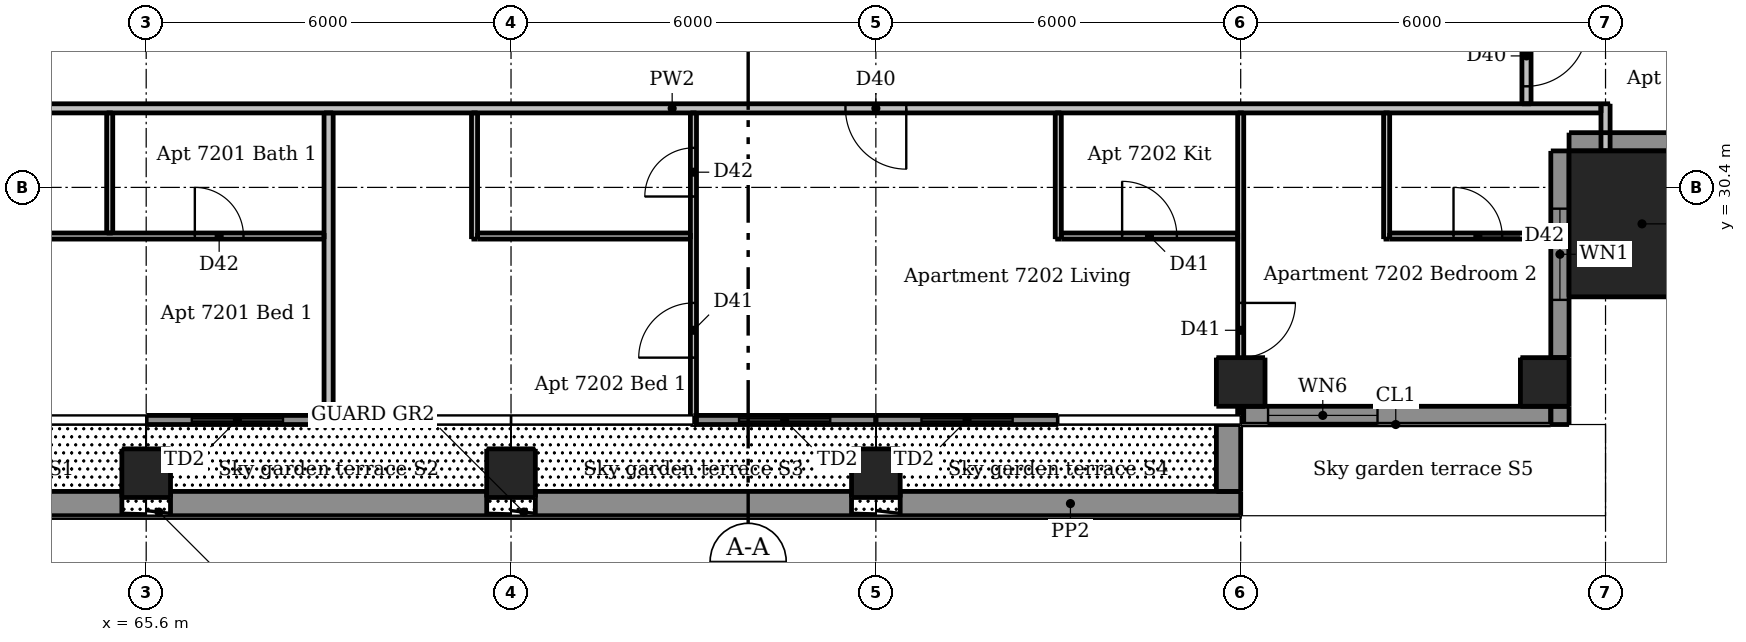
"""IFC4 building model, lengths in metres.
Left out: names, types, materials, properties, quantities, classifications, styles, units other than length and angle.
Written with IfcOpenShell. Run it as: python <this file> out.ifc"""

import sys

from ifc_helpers import new_model, si_unit, direction, frame, frame_2d, origin, origin_2d, place, context, subcontext, project, spatial, rectangle, extrude, element, fill, save


model = new_model("IFC4")
c1 = context("Model", 3, precision=1e-05, world=origin(), true_north=direction((0.0, 1.0)))
c2 = subcontext(c1, "Body", "Model", "MODEL_VIEW")
j1 = project(units=[si_unit("LENGTHUNIT", "METRE"), si_unit("PLANEANGLEUNIT", "RADIAN")], contexts=[c1])
p1 = place(None, origin())
s1 = spatial("IfcSite", under=j1, at=p1, CompositionType="ELEMENT")
p2 = place(p1, origin())
s2 = spatial("IfcBuilding", under=s1, at=p2, CompositionType="ELEMENT")
p3 = place(p2, frame((0.0, 0.0, 268.6)))
s3 = spatial("IfcBuildingStorey", under=s2, at=p3, CompositionType="ELEMENT", Elevation=268.6)
for number, where, z_axis, x_axis in (
    (1, (65.6, 25.7, 0.0), (0.0, 0.0, 1.0), (1.0, 0.0, 0.0)),
    (2, (71.6, 25.7, 0.0), (0.0, 0.0, 1.0), (1.0, 0.0, 0.0)),
    (3, (77.6, 25.7, 0.0), (0.0, 0.0, 1.0), (1.0, 0.0, 0.0)),
):
    element("IfcColumn", number, at=place(p3, frame(where, z_axis=z_axis, x_axis=x_axis)), inside=s3, PredefinedType="COLUMN", context=c2, shape_type="SweptSolid", body=[
        extrude(rectangle(XDim=0.8, YDim=0.8, at=origin_2d()), origin(), (0.0, 0.0, 1.0), 3.3),
    ])
for number, where, z_axis, x_axis in (
    (4, (83.6, 27.2, 0.0), (0.0, 0.0, 1.0), (1.0, 0.0, 0.0)),
    (5, (88.6, 27.2, 0.0), (0.0, 0.0, 1.0), (1.0, 0.0, 0.0)),
):
    element("IfcColumn", number, at=place(p3, frame(where, z_axis=z_axis, x_axis=x_axis)), inside=s3, PredefinedType="COLUMN", context=c2, shape_type="SweptSolid", body=[
        extrude(rectangle(XDim=0.8, YDim=0.8, at=origin_2d()), origin(), (0.0, 0.0, 1.0), 3.05),
    ])
p4 = place(p3, frame((90.2, 29.8, 0.0), z_axis=(0.0, 0.0, 1.0), x_axis=(1.0, 0.0, 0.0)))
e6 = element("IfcColumn", 6, at=p4, inside=s3, PredefinedType="COLUMN", context=c2, shape_type="SweptSolid", body=[
    extrude(rectangle(XDim=2.4, YDim=2.4, at=origin_2d()), origin(), (0.0, 0.0, 1.0), 3.3),
])
p5 = place(p3, frame((88.85, 26.5, 0.0), z_axis=(0.0, 0.0, 1.0), x_axis=(0.0, 1.0, 0.0)))
e7 = element("IfcWall", 7, at=p5, inside=s3, PredefinedType="SOLIDWALL", context=c2, shape_type="SweptSolid", body=[
    extrude(rectangle(XDim=0.3, YDim=0.3, at=frame_2d((0.15, 0.0))), origin(), (0.0, 0.0, 1.0), 3.05),
])
p6 = place(p3, frame((88.85, 27.6, 0.0), z_axis=(0.0, 0.0, 1.0), x_axis=(0.0, 1.0, 0.0)))
e8 = element("IfcWall", 8, at=p6, inside=s3, PredefinedType="SOLIDWALL", context=c2, shape_type="SweptSolid", body=[
    extrude(rectangle(XDim=3.4, YDim=0.3, at=frame_2d((1.7, 0.0))), origin(), (0.0, 0.0, 1.0), 3.05),
])
p7 = place(p6, frame((0.95, 0.0, 0.9)))
e9 = element("IfcOpeningElement", 9, at=p7, cuts=e8, PredefinedType="OPENING", context=c2, shape_type="SweptSolid", body=[
    extrude(rectangle(XDim=1.5, YDim=1.5, at=frame_2d((0.75, 0.75))), frame((0.0, 0.16, 0.0), z_axis=(0.0, -1.0, 0.0), x_axis=(1.0, 0.0, 0.0)), (0.0, 0.0, 1.0), 0.32),
])
p8 = place(p3, frame((89.0, 31.15, 0.0), z_axis=(0.0, 0.0, 1.0), x_axis=(1.0, 0.0, 0.0)))
e10 = element("IfcWall", 10, at=p8, inside=s3, PredefinedType="SOLIDWALL", context=c2, shape_type="SweptSolid", body=[
    extrude(rectangle(XDim=3.4, YDim=0.3, at=frame_2d((1.7, 0.0))), origin(), (0.0, 0.0, 1.0), 3.05),
])
p9 = place(p3, frame((65.6, 26.575, 0.0), z_axis=(0.0, 0.0, 1.0), x_axis=(1.0, 0.0, 0.0)))
e11 = element("IfcWall", 11, at=p9, inside=s3, PredefinedType="SOLIDWALL", context=c2, shape_type="SweptSolid", body=[
    extrude(rectangle(XDim=3.0, YDim=0.15, at=frame_2d((1.5, 0.0))), origin(), (0.0, 0.0, 1.0), 3.05),
])
p10 = place(p9, frame((0.75, 0.0, 0.0)))
e12 = element("IfcOpeningElement", 12, at=p10, cuts=e11, PredefinedType="OPENING", context=c2, shape_type="SweptSolid", body=[
    extrude(rectangle(XDim=1.5, YDim=2.4, at=frame_2d((0.75, 1.2))), frame((0.0, 0.085, 0.0), z_axis=(0.0, -1.0, 0.0), x_axis=(1.0, 0.0, 0.0)), (0.0, 0.0, 1.0), 0.17),
])
p11 = place(p3, frame((74.6, 26.575, 0.0), z_axis=(0.0, 0.0, 1.0), x_axis=(1.0, 0.0, 0.0)))
e13 = element("IfcWall", 13, at=p11, inside=s3, PredefinedType="SOLIDWALL", context=c2, shape_type="SweptSolid", body=[
    extrude(rectangle(XDim=3.0, YDim=0.15, at=frame_2d((1.5, 0.0))), origin(), (0.0, 0.0, 1.0), 3.05),
])
p12 = place(p11, frame((0.75, 0.0, 0.0)))
e14 = element("IfcOpeningElement", 14, at=p12, cuts=e13, PredefinedType="OPENING", context=c2, shape_type="SweptSolid", body=[
    extrude(rectangle(XDim=1.5, YDim=2.4, at=frame_2d((0.75, 1.2))), frame((0.0, 0.085, 0.0), z_axis=(0.0, -1.0, 0.0), x_axis=(1.0, 0.0, 0.0)), (0.0, 0.0, 1.0), 0.17),
])
p13 = place(p3, frame((77.6, 26.575, 0.0), z_axis=(0.0, 0.0, 1.0), x_axis=(1.0, 0.0, 0.0)))
e15 = element("IfcWall", 15, at=p13, inside=s3, PredefinedType="SOLIDWALL", context=c2, shape_type="SweptSolid", body=[
    extrude(rectangle(XDim=3.0, YDim=0.15, at=frame_2d((1.5, 0.0))), origin(), (0.0, 0.0, 1.0), 3.05),
])
p14 = place(p13, frame((0.75, 0.0, 0.0)))
e16 = element("IfcOpeningElement", 16, at=p14, cuts=e15, PredefinedType="OPENING", context=c2, shape_type="SweptSolid", body=[
    extrude(rectangle(XDim=1.5, YDim=2.4, at=frame_2d((0.75, 1.2))), frame((0.0, 0.085, 0.0), z_axis=(0.0, -1.0, 0.0), x_axis=(1.0, 0.0, 0.0)), (0.0, 0.0, 1.0), 0.17),
])
p15 = place(p3, frame((83.6, 26.65, 0.0), z_axis=(0.0, 0.0, 1.0), x_axis=(1.0, 0.0, 0.0)))
e17 = element("IfcWall", 17, at=p15, inside=s3, PredefinedType="SOLIDWALL", context=c2, shape_type="SweptSolid", body=[
    extrude(rectangle(XDim=5.1, YDim=0.3, at=frame_2d((2.55, 0.0))), origin(), (0.0, 0.0, 1.0), 3.05),
])
p16 = place(p15, frame((0.45, 0.0, 0.15)))
e18 = element("IfcOpeningElement", 18, at=p16, cuts=e17, PredefinedType="OPENING", context=c2, shape_type="SweptSolid", body=[
    extrude(rectangle(XDim=1.8, YDim=2.1, at=frame_2d((0.9, 1.05))), frame((0.0, 0.16, 0.0), z_axis=(0.0, -1.0, 0.0), x_axis=(1.0, 0.0, 0.0)), (0.0, 0.0, 1.0), 0.32),
])
for number, where, z_axis, x_axis in (
    (19, (60.0, 25.2, 0.03), (0.0, 0.0, 1.0), (1.0, 0.0, 0.0)),
    (20, (66.0, 25.2, 0.03), (0.0, 0.0, 1.0), (1.0, 0.0, 0.0)),
    (21, (72.0, 25.2, 0.03), (0.0, 0.0, 1.0), (1.0, 0.0, 0.0)),
):
    element("IfcWall", number, at=place(p3, frame(where, z_axis=z_axis, x_axis=x_axis)), inside=s3, PredefinedType="PARAPET", context=c2, shape_type="SweptSolid", body=[
        extrude(rectangle(XDim=5.2, YDim=0.4, at=frame_2d((2.6, 0.0))), origin(), (0.0, 0.0, 1.0), 1.1),
    ])
p17 = place(p3, frame((78.0, 25.2, 0.03), z_axis=(0.0, 0.0, 1.0), x_axis=(1.0, 0.0, 0.0)))
e22 = element("IfcWall", 22, at=p17, inside=s3, PredefinedType="PARAPET", context=c2, shape_type="SweptSolid", body=[
    extrude(rectangle(XDim=5.6, YDim=0.4, at=frame_2d((2.8, 0.0))), origin(), (0.0, 0.0, 1.0), 1.1),
])
p18 = place(p3, frame((83.4, 25.4, 0.03), z_axis=(0.0, 0.0, 1.0), x_axis=(0.0, 1.0, 0.0)))
e23 = element("IfcWall", 23, at=p18, inside=s3, PredefinedType="PARAPET", context=c2, shape_type="SweptSolid", body=[
    extrude(rectangle(XDim=1.1, YDim=0.4, at=frame_2d((0.55, 0.0))), origin(), (0.0, 0.0, 1.0), 1.1),
])
p19 = place(p3, frame((65.0, 29.65, 0.0), z_axis=(0.0, 0.0, 1.0), x_axis=(0.0, 1.0, 0.0)))
e24 = element("IfcWall", 24, at=p19, inside=s3, PredefinedType="PARTITIONING", context=c2, shape_type="SweptSolid", body=[
    extrude(rectangle(XDim=1.975, YDim=0.1, at=frame_2d((0.988, 0.0))), origin(), (0.0, 0.0, 1.0), 3.05),
])
p20 = place(p3, frame((71.0, 29.55, 0.0), z_axis=(0.0, 0.0, 1.0), x_axis=(0.0, 1.0, 0.0)))
e25 = element("IfcWall", 25, at=p20, inside=s3, PredefinedType="PARTITIONING", context=c2, shape_type="SweptSolid", body=[
    extrude(rectangle(XDim=2.075, YDim=0.1, at=frame_2d((1.038, 0.0))), origin(), (0.0, 0.0, 1.0), 3.05),
])
p21 = place(p3, frame((74.6, 26.5, 0.0), z_axis=(0.0, 0.0, 1.0), x_axis=(0.0, 1.0, 0.0)))
e26 = element("IfcWall", 26, at=p21, inside=s3, PredefinedType="PARTITIONING", context=c2, shape_type="SweptSolid", body=[
    extrude(rectangle(XDim=5.125, YDim=0.1, at=frame_2d((2.562, 0.0))), origin(), (0.0, 0.0, 1.0), 3.05),
])
p22 = place(p21, frame((1.1, 0.0, 0.0)))
e27 = element("IfcOpeningElement", 27, at=p22, cuts=e26, PredefinedType="OPENING", context=c2, shape_type="SweptSolid", body=[
    extrude(rectangle(XDim=0.9, YDim=2.1, at=frame_2d((0.45, 1.05))), frame((0.0, 0.06, 0.0), z_axis=(0.0, -1.0, 0.0), x_axis=(1.0, 0.0, 0.0)), (0.0, 0.0, 1.0), 0.12),
])
p23 = place(p21, frame((3.75, 0.0, 0.0)))
e28 = element("IfcOpeningElement", 28, at=p23, cuts=e26, PredefinedType="OPENING", context=c2, shape_type="SweptSolid", body=[
    extrude(rectangle(XDim=0.8, YDim=2.1, at=frame_2d((0.4, 1.05))), frame((0.0, 0.06, 0.0), z_axis=(0.0, -1.0, 0.0), x_axis=(1.0, 0.0, 0.0)), (0.0, 0.0, 1.0), 0.12),
])
p24 = place(p3, frame((80.6, 29.55, 0.0), z_axis=(0.0, 0.0, 1.0), x_axis=(0.0, 1.0, 0.0)))
e29 = element("IfcWall", 29, at=p24, inside=s3, PredefinedType="PARTITIONING", context=c2, shape_type="SweptSolid", body=[
    extrude(rectangle(XDim=2.075, YDim=0.1, at=frame_2d((1.038, 0.0))), origin(), (0.0, 0.0, 1.0), 3.05),
])
p25 = place(p3, frame((83.6, 31.625, 0.0), z_axis=(0.0, 0.0, 1.0), x_axis=(0.0, -1.0, 0.0)))
e30 = element("IfcWall", 30, at=p25, inside=s3, PredefinedType="PARTITIONING", context=c2, shape_type="SweptSolid", body=[
    extrude(rectangle(XDim=5.125, YDim=0.1, at=frame_2d((2.562, 0.0))), origin(), (0.0, 0.0, 1.0), 2.647),
])
p26 = place(p25, frame((3.125, 0.0, 0.0)))
e31 = element("IfcOpeningElement", 31, at=p26, cuts=e30, PredefinedType="OPENING", context=c2, shape_type="SweptSolid", body=[
    extrude(rectangle(XDim=0.9, YDim=2.1, at=frame_2d((0.45, 1.05))), frame((0.0, 0.06, 0.0), z_axis=(0.0, -1.0, 0.0), x_axis=(1.0, 0.0, 0.0)), (0.0, 0.0, 1.0), 0.12),
])
p27 = place(p3, frame((86.0, 29.55, 0.0), z_axis=(0.0, 0.0, 1.0), x_axis=(0.0, 1.0, 0.0)))
e32 = element("IfcWall", 32, at=p27, inside=s3, PredefinedType="PARTITIONING", context=c2, shape_type="SweptSolid", body=[
    extrude(rectangle(XDim=2.075, YDim=0.1, at=frame_2d((1.038, 0.0))), origin(), (0.0, 0.0, 1.0), 3.05),
])
p28 = place(p3, frame((62.65, 29.6, 0.0), z_axis=(0.0, 0.0, 1.0), x_axis=(1.0, 0.0, 0.0)))
e33 = element("IfcWall", 33, at=p28, inside=s3, PredefinedType="PARTITIONING", context=c2, shape_type="SweptSolid", body=[
    extrude(rectangle(XDim=5.875, YDim=0.1, at=frame_2d((2.938, 0.0))), origin(), (0.0, 0.0, 1.0), 3.05),
])
p29 = place(p28, frame((3.75, 0.0, 0.0)))
e34 = element("IfcOpeningElement", 34, at=p29, cuts=e33, PredefinedType="OPENING", context=c2, shape_type="SweptSolid", body=[
    extrude(rectangle(XDim=0.8, YDim=2.1, at=frame_2d((0.4, 1.05))), frame((0.0, 0.06, 0.0), z_axis=(0.0, -1.0, 0.0), x_axis=(1.0, 0.0, 0.0)), (0.0, 0.0, 1.0), 0.12),
])
p30 = place(p3, frame((71.05, 29.6, 0.0), z_axis=(0.0, 0.0, 1.0), x_axis=(1.0, 0.0, 0.0)))
e35 = element("IfcWall", 35, at=p30, inside=s3, PredefinedType="PARTITIONING", context=c2, shape_type="SweptSolid", body=[
    extrude(rectangle(XDim=3.5, YDim=0.1, at=frame_2d((1.75, 0.0))), origin(), (0.0, 0.0, 1.0), 3.05),
])
p31 = place(p3, frame((80.65, 29.6, 0.0), z_axis=(0.0, 0.0, 1.0), x_axis=(1.0, 0.0, 0.0)))
e36 = element("IfcWall", 36, at=p31, inside=s3, PredefinedType="PARTITIONING", context=c2, shape_type="SweptSolid", body=[
    extrude(rectangle(XDim=2.9, YDim=0.1, at=frame_2d((1.45, 0.0))), origin(), (0.0, 0.0, 1.0), 3.05),
])
p32 = place(p31, frame((1.0, 0.0, 0.0)))
e37 = element("IfcOpeningElement", 37, at=p32, cuts=e36, PredefinedType="OPENING", context=c2, shape_type="SweptSolid", body=[
    extrude(rectangle(XDim=0.9, YDim=2.1, at=frame_2d((0.45, 1.05))), frame((0.0, 0.06, 0.0), z_axis=(0.0, -1.0, 0.0), x_axis=(1.0, 0.0, 0.0)), (0.0, 0.0, 1.0), 0.12),
])
p33 = place(p3, frame((86.05, 29.6, 0.0), z_axis=(0.0, 0.0, 1.0), x_axis=(1.0, 0.0, 0.0)))
e38 = element("IfcWall", 38, at=p33, inside=s3, PredefinedType="PARTITIONING", context=c2, shape_type="SweptSolid", body=[
    extrude(rectangle(XDim=2.75, YDim=0.1, at=frame_2d((1.375, 0.0))), origin(), (0.0, 0.0, 1.0), 3.05),
])
p34 = place(p33, frame((1.05, 0.0, 0.0)))
e39 = element("IfcOpeningElement", 39, at=p34, cuts=e38, PredefinedType="OPENING", context=c2, shape_type="SweptSolid", body=[
    extrude(rectangle(XDim=0.8, YDim=2.1, at=frame_2d((0.4, 1.05))), frame((0.0, 0.06, 0.0), z_axis=(0.0, -1.0, 0.0), x_axis=(1.0, 0.0, 0.0)), (0.0, 0.0, 1.0), 0.12),
])
p35 = place(p3, frame((68.6, 26.5, 0.0), z_axis=(0.0, 0.0, 1.0), x_axis=(0.0, 1.0, 0.0)))
e40 = element("IfcWall", 40, at=p35, inside=s3, PredefinedType="PARTITIONING", context=c2, shape_type="SweptSolid", body=[
    extrude(rectangle(XDim=5.125, YDim=0.15, at=frame_2d((2.562, 0.0))), origin(), (0.0, 0.0, 1.0), 3.05),
])
p36 = place(p3, frame((88.3, 61.175, 0.0), z_axis=(0.0, 0.0, 1.0), x_axis=(0.0, -1.0, 0.0)))
e41 = element("IfcWall", 41, at=p36, inside=s3, PredefinedType="PARTITIONING", context=c2, shape_type="SweptSolid", body=[
    extrude(rectangle(XDim=29.4, YDim=0.15, at=frame_2d((14.7, 0.0))), origin(), (0.0, 0.0, 1.0), 3.05),
])
p37 = place(p36, frame((28.113, 0.0, 0.0)))
e42 = element("IfcOpeningElement", 42, at=p37, cuts=e41, PredefinedType="OPENING", context=c2, shape_type="SweptSolid", body=[
    extrude(rectangle(XDim=1.0, YDim=2.1, at=frame_2d((0.5, 1.05))), frame((0.0, 0.085, 0.0), z_axis=(0.0, -1.0, 0.0), x_axis=(1.0, 0.0, 0.0)), (0.0, 0.0, 1.0), 0.17),
])
p38 = place(p36, frame((10.775, 0.0, 0.0)))
e43 = element("IfcOpeningElement", 43, at=p38, cuts=e41, PredefinedType="OPENING", context=c2, shape_type="SweptSolid", body=[
    extrude(rectangle(XDim=1.0, YDim=2.1, at=frame_2d((0.5, 1.05))), frame((0.0, 0.085, 0.0), z_axis=(0.0, -1.0, 0.0), x_axis=(1.0, 0.0, 0.0)), (0.0, 0.0, 1.0), 0.17),
])
p39 = place(p3, frame((89.6, 31.0, 0.0), z_axis=(0.0, 0.0, 1.0), x_axis=(0.0, 1.0, 0.0)))
e44 = element("IfcWall", 44, at=p39, inside=s3, PredefinedType="PARTITIONING", context=c2, shape_type="SweptSolid", body=[
    extrude(rectangle(XDim=0.775, YDim=0.15, at=frame_2d((0.387, 0.0))), origin(), (0.0, 0.0, 1.0), 3.05),
])
p40 = place(p3, frame((89.525, 31.7, 0.0), z_axis=(0.0, 0.0, 1.0), x_axis=(-1.0, 0.0, 0.0)))
e45 = element("IfcWall", 45, at=p40, inside=s3, PredefinedType="PARTITIONING", context=c2, shape_type="SweptSolid", body=[
    extrude(rectangle(XDim=30.55, YDim=0.15, at=frame_2d((15.275, 0.0))), origin(), (0.0, 0.0, 1.0), 3.05),
])
p41 = place(p40, frame((28.275, 0.0, 0.0)))
e46 = element("IfcOpeningElement", 46, at=p41, cuts=e45, PredefinedType="OPENING", context=c2, shape_type="SweptSolid", body=[
    extrude(rectangle(XDim=1.0, YDim=2.1, at=frame_2d((0.5, 1.05))), frame((0.0, 0.085, 0.0), z_axis=(0.0, -1.0, 0.0), x_axis=(1.0, 0.0, 0.0)), (0.0, 0.0, 1.0), 0.17),
])
p42 = place(p40, frame((11.425, 0.0, 0.0)))
e47 = element("IfcOpeningElement", 47, at=p42, cuts=e45, PredefinedType="OPENING", context=c2, shape_type="SweptSolid", body=[
    extrude(rectangle(XDim=1.0, YDim=2.1, at=frame_2d((0.5, 1.05))), frame((0.0, 0.085, 0.0), z_axis=(0.0, -1.0, 0.0), x_axis=(1.0, 0.0, 0.0)), (0.0, 0.0, 1.0), 0.17),
])
p43 = place(p7, origin())
e48 = element("IfcWindow", 48, at=p43, inside=s3, PartitioningType="DOUBLE_PANEL_VERTICAL", PredefinedType="WINDOW", context=c2, shape_type="SweptSolid", body=[
    extrude(rectangle(XDim=1.5, YDim=1.5, at=frame_2d((0.75, 0.75))), frame((0.0, 0.03, 0.0), z_axis=(0.0, -1.0, 0.0), x_axis=(1.0, 0.0, 0.0)), (0.0, 0.0, 1.0), 0.06),
])
fill(e9, e48)
p44 = place(p10, origin())
e49 = element("IfcDoor", 49, at=p44, inside=s3, OperationType="DOUBLE_DOOR_SLIDING", PredefinedType="DOOR", context=c2, shape_type="SweptSolid", body=[
    extrude(rectangle(XDim=1.5, YDim=2.4, at=frame_2d((0.75, 1.2))), frame((0.0, 0.025, 0.0), z_axis=(0.0, -1.0, 0.0), x_axis=(1.0, 0.0, 0.0)), (0.0, 0.0, 1.0), 0.05),
])
fill(e12, e49)
p45 = place(p12, origin())
e50 = element("IfcDoor", 50, at=p45, inside=s3, OperationType="DOUBLE_DOOR_SLIDING", PredefinedType="DOOR", context=c2, shape_type="SweptSolid", body=[
    extrude(rectangle(XDim=1.5, YDim=2.4, at=frame_2d((0.75, 1.2))), frame((0.0, 0.025, 0.0), z_axis=(0.0, -1.0, 0.0), x_axis=(1.0, 0.0, 0.0)), (0.0, 0.0, 1.0), 0.05),
])
fill(e14, e50)
p46 = place(p14, origin())
e51 = element("IfcDoor", 51, at=p46, inside=s3, OperationType="DOUBLE_DOOR_SLIDING", PredefinedType="DOOR", context=c2, shape_type="SweptSolid", body=[
    extrude(rectangle(XDim=1.5, YDim=2.4, at=frame_2d((0.75, 1.2))), frame((0.0, 0.025, 0.0), z_axis=(0.0, -1.0, 0.0), x_axis=(1.0, 0.0, 0.0)), (0.0, 0.0, 1.0), 0.05),
])
fill(e16, e51)
p47 = place(p16, origin())
e52 = element("IfcWindow", 52, at=p47, inside=s3, PartitioningType="DOUBLE_PANEL_VERTICAL", PredefinedType="WINDOW", context=c2, shape_type="SweptSolid", body=[
    extrude(rectangle(XDim=1.8, YDim=2.1, at=frame_2d((0.9, 1.05))), frame((0.0, 0.03, 0.0), z_axis=(0.0, -1.0, 0.0), x_axis=(1.0, 0.0, 0.0)), (0.0, 0.0, 1.0), 0.06),
])
fill(e18, e52)
p48 = place(p29, origin())
e53 = element("IfcDoor", 53, at=p48, inside=s3, OperationType="SINGLE_SWING_LEFT", PredefinedType="DOOR", context=c2, shape_type="SweptSolid", body=[
    extrude(rectangle(XDim=0.8, YDim=2.1, at=frame_2d((0.4, 1.05))), frame((0.0, 0.025, 0.0), z_axis=(0.0, -1.0, 0.0), x_axis=(1.0, 0.0, 0.0)), (0.0, 0.0, 1.0), 0.05),
])
fill(e34, e53)
p49 = place(p42, origin())
e54 = element("IfcDoor", 54, at=p49, inside=s3, OperationType="SINGLE_SWING_LEFT", PredefinedType="DOOR", context=c2, shape_type="SweptSolid", body=[
    extrude(rectangle(XDim=1.0, YDim=2.1, at=frame_2d((0.5, 1.05))), frame((0.0, 0.025, 0.0), z_axis=(0.0, -1.0, 0.0), x_axis=(1.0, 0.0, 0.0)), (0.0, 0.0, 1.0), 0.05),
])
fill(e47, e54)
p50 = place(p32, origin())
e55 = element("IfcDoor", 55, at=p50, inside=s3, OperationType="SINGLE_SWING_LEFT", PredefinedType="DOOR", context=c2, shape_type="SweptSolid", body=[
    extrude(rectangle(XDim=0.9, YDim=2.1, at=frame_2d((0.45, 1.05))), frame((0.0, 0.025, 0.0), z_axis=(0.0, -1.0, 0.0), x_axis=(1.0, 0.0, 0.0)), (0.0, 0.0, 1.0), 0.05),
])
fill(e37, e55)
p51 = place(p22, origin())
e56 = element("IfcDoor", 56, at=p51, inside=s3, OperationType="SINGLE_SWING_LEFT", PredefinedType="DOOR", context=c2, shape_type="SweptSolid", body=[
    extrude(rectangle(XDim=0.9, YDim=2.1, at=frame_2d((0.45, 1.05))), frame((0.0, 0.025, 0.0), z_axis=(0.0, -1.0, 0.0), x_axis=(1.0, 0.0, 0.0)), (0.0, 0.0, 1.0), 0.05),
])
fill(e27, e56)
p52 = place(p23, origin())
e57 = element("IfcDoor", 57, at=p52, inside=s3, OperationType="SINGLE_SWING_LEFT", PredefinedType="DOOR", context=c2, shape_type="SweptSolid", body=[
    extrude(rectangle(XDim=0.8, YDim=2.1, at=frame_2d((0.4, 1.05))), frame((0.0, 0.025, 0.0), z_axis=(0.0, -1.0, 0.0), x_axis=(1.0, 0.0, 0.0)), (0.0, 0.0, 1.0), 0.05),
])
fill(e28, e57)
p53 = place(p26, origin())
e58 = element("IfcDoor", 58, at=p53, inside=s3, OperationType="SINGLE_SWING_LEFT", PredefinedType="DOOR", context=c2, shape_type="SweptSolid", body=[
    extrude(rectangle(XDim=0.9, YDim=2.1, at=frame_2d((0.45, 1.05))), frame((0.0, 0.025, 0.0), z_axis=(0.0, -1.0, 0.0), x_axis=(1.0, 0.0, 0.0)), (0.0, 0.0, 1.0), 0.05),
])
fill(e31, e58)
p54 = place(p34, origin())
e59 = element("IfcDoor", 59, at=p54, inside=s3, OperationType="SINGLE_SWING_LEFT", PredefinedType="DOOR", context=c2, shape_type="SweptSolid", body=[
    extrude(rectangle(XDim=0.8, YDim=2.1, at=frame_2d((0.4, 1.05))), frame((0.0, 0.025, 0.0), z_axis=(0.0, -1.0, 0.0), x_axis=(1.0, 0.0, 0.0)), (0.0, 0.0, 1.0), 0.05),
])
fill(e39, e59)
p55 = place(p37, origin())
e60 = element("IfcDoor", 60, at=p55, inside=s3, OperationType="SINGLE_SWING_LEFT", PredefinedType="DOOR", context=c2, shape_type="SweptSolid", body=[
    extrude(rectangle(XDim=1.0, YDim=2.1, at=frame_2d((0.5, 1.05))), frame((0.0, 0.025, 0.0), z_axis=(0.0, -1.0, 0.0), x_axis=(1.0, 0.0, 0.0)), (0.0, 0.0, 1.0), 0.05),
])
fill(e42, e60)
save(model, sys.argv[1])
